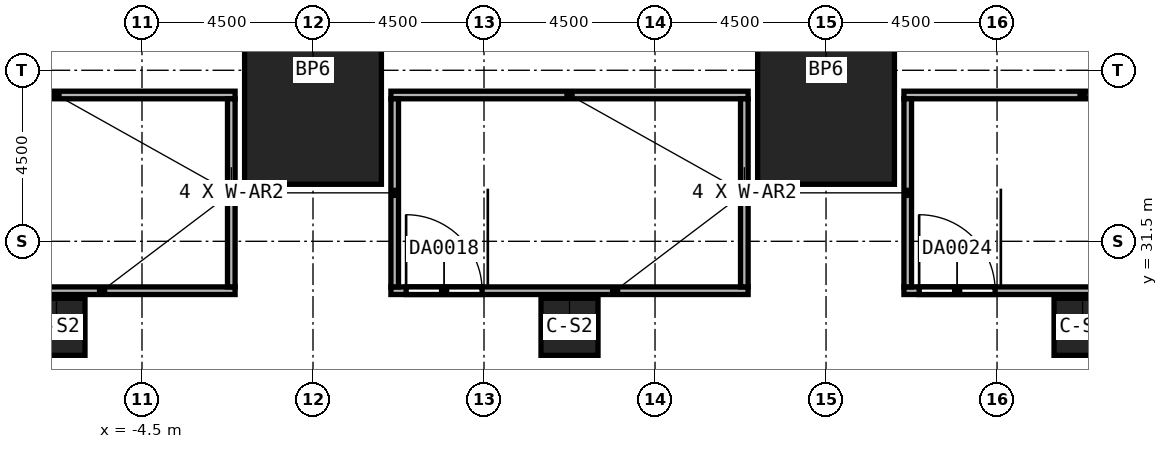
"""IFC4 building model, lengths in metres.
Left out: names, types, materials, properties, quantities, classifications, styles, units other than length and angle.
Written with IfcOpenShell. Run it as: python <this file> out.ifc"""

import sys

from ifc_helpers import new_model, si_unit, direction, frame, frame_2d, origin, origin_2d, place, context, subcontext, project, spatial, rectangle, extrude, element, fill, save


model = new_model("IFC4")
c1 = context("Model", 3, precision=1e-05, world=origin(), true_north=direction((0.0, 1.0)))
c2 = subcontext(c1, "Body", "Model", "MODEL_VIEW")
j1 = project(units=[si_unit("LENGTHUNIT", "METRE"), si_unit("PLANEANGLEUNIT", "RADIAN")], contexts=[c1])
p1 = place(None, origin())
s1 = spatial("IfcSite", under=j1, at=p1, CompositionType="ELEMENT")
p2 = place(p1, origin())
s2 = spatial("IfcBuilding", under=s1, at=p2, CompositionType="ELEMENT")
p3 = place(p2, frame((0.0, 0.0, 37.0)))
s3 = spatial("IfcBuildingStorey", under=s2, at=p3, CompositionType="ELEMENT", Elevation=37.0)
for number, where, z_axis, x_axis in (
    (1, (0.0, 36.0, 0.0), (0.0, 0.0, 1.0), (1.0, 0.0, 0.0)),
    (2, (13.5, 36.0, 0.0), (0.0, 0.0, 1.0), (1.0, 0.0, 0.0)),
):
    element("IfcColumn", number, at=place(p3, frame(where, z_axis=z_axis, x_axis=x_axis)), inside=s3, PredefinedType="COLUMN", context=c2, shape_type="SweptSolid", body=[
        extrude(rectangle(XDim=3.6, YDim=6.0, at=origin_2d()), origin(), (0.0, 0.0, 1.0), 5.8),
    ])
for number, where, z_axis, x_axis in (
    (3, (-6.75, 29.25, 0.0), (0.0, 0.0, 1.0), (1.0, 0.0, 0.0)),
    (4, (6.75, 29.25, 0.0), (0.0, 0.0, 1.0), (1.0, 0.0, 0.0)),
    (5, (20.25, 29.25, 0.0), (0.0, 0.0, 1.0), (1.0, 0.0, 0.0)),
):
    element("IfcColumn", number, at=place(p3, frame(where, z_axis=z_axis, x_axis=x_axis)), inside=s3, PredefinedType="COLUMN", context=c2, shape_type="SweptSolid", body=[
        extrude(rectangle(XDim=1.5, YDim=1.5, at=origin_2d()), origin(), (0.0, 0.0, 1.0), 7.0),
    ])
p4 = place(p3, frame((-11.45, 30.2, 0.0), z_axis=(0.0, 0.0, 1.0), x_axis=(1.0, 0.0, 0.0)))
e6 = element("IfcWall", 6, at=p4, inside=s3, PredefinedType="SOLIDWALL", context=c2, shape_type="SweptSolid", body=[
    extrude(rectangle(XDim=9.4, YDim=0.2, at=frame_2d((4.7, 0.0))), origin(), (0.0, 0.0, 1.0), 7.0),
])
p5 = place(p4, frame((0.4, 0.0, 0.0)))
e7 = element("IfcOpeningElement", 7, at=p5, cuts=e6, PredefinedType="OPENING", context=c2, shape_type="SweptSolid", body=[
    extrude(rectangle(XDim=2.0, YDim=2.4, at=frame_2d((1.0, 1.2))), frame((0.0, 0.1, 0.0), z_axis=(0.0, -1.0, 0.0), x_axis=(1.0, 0.0, 0.0)), (0.0, 0.0, 1.0), 0.2),
])
p6 = place(p3, frame((-11.45, 35.35, 0.0), z_axis=(0.0, 0.0, 1.0), x_axis=(1.0, 0.0, 0.0)))
e8 = element("IfcWall", 8, at=p6, inside=s3, PredefinedType="SOLIDWALL", context=c2, shape_type="SweptSolid", body=[
    extrude(rectangle(XDim=9.4, YDim=0.2, at=frame_2d((4.7, 0.0))), origin(), (0.0, 0.0, 1.0), 7.0),
])
p7 = place(p3, frame((-2.15, 30.3, 0.0), z_axis=(0.0, 0.0, 1.0), x_axis=(0.0, 1.0, 0.0)))
e9 = element("IfcWall", 9, at=p7, inside=s3, PredefinedType="SOLIDWALL", context=c2, shape_type="SweptSolid", body=[
    extrude(rectangle(XDim=4.95, YDim=0.2, at=frame_2d((2.475, 0.0))), origin(), (0.0, 0.0, 1.0), 7.0),
])
p8 = place(p3, frame((2.05, 30.2, 0.0), z_axis=(0.0, 0.0, 1.0), x_axis=(1.0, 0.0, 0.0)))
e10 = element("IfcWall", 10, at=p8, inside=s3, PredefinedType="SOLIDWALL", context=c2, shape_type="SweptSolid", body=[
    extrude(rectangle(XDim=9.4, YDim=0.2, at=frame_2d((4.7, 0.0))), origin(), (0.0, 0.0, 1.0), 7.0),
])
p9 = place(p8, frame((0.4, 0.0, 0.0)))
e11 = element("IfcOpeningElement", 11, at=p9, cuts=e10, PredefinedType="OPENING", context=c2, shape_type="SweptSolid", body=[
    extrude(rectangle(XDim=2.0, YDim=2.4, at=frame_2d((1.0, 1.2))), frame((0.0, 0.1, 0.0), z_axis=(0.0, -1.0, 0.0), x_axis=(1.0, 0.0, 0.0)), (0.0, 0.0, 1.0), 0.2),
])
p10 = place(p3, frame((2.05, 35.35, 0.0), z_axis=(0.0, 0.0, 1.0), x_axis=(1.0, 0.0, 0.0)))
e12 = element("IfcWall", 12, at=p10, inside=s3, PredefinedType="SOLIDWALL", context=c2, shape_type="SweptSolid", body=[
    extrude(rectangle(XDim=9.4, YDim=0.2, at=frame_2d((4.7, 0.0))), origin(), (0.0, 0.0, 1.0), 7.0),
])
for number, where, z_axis, x_axis in (
    (13, (2.15, 30.3, 0.0), (0.0, 0.0, 1.0), (0.0, 1.0, 0.0)),
    (14, (11.35, 30.3, 0.0), (0.0, 0.0, 1.0), (0.0, 1.0, 0.0)),
):
    element("IfcWall", number, at=place(p3, frame(where, z_axis=z_axis, x_axis=x_axis)), inside=s3, PredefinedType="SOLIDWALL", context=c2, shape_type="SweptSolid", body=[
        extrude(rectangle(XDim=4.95, YDim=0.2, at=frame_2d((2.475, 0.0))), origin(), (0.0, 0.0, 1.0), 7.0),
    ])
p11 = place(p3, frame((15.55, 30.2, 0.0), z_axis=(0.0, 0.0, 1.0), x_axis=(1.0, 0.0, 0.0)))
e15 = element("IfcWall", 15, at=p11, inside=s3, PredefinedType="SOLIDWALL", context=c2, shape_type="SweptSolid", body=[
    extrude(rectangle(XDim=9.4, YDim=0.2, at=frame_2d((4.7, 0.0))), origin(), (0.0, 0.0, 1.0), 7.0),
])
p12 = place(p11, frame((0.4, 0.0, 0.0)))
e16 = element("IfcOpeningElement", 16, at=p12, cuts=e15, PredefinedType="OPENING", context=c2, shape_type="SweptSolid", body=[
    extrude(rectangle(XDim=2.0, YDim=2.4, at=frame_2d((1.0, 1.2))), frame((0.0, 0.1, 0.0), z_axis=(0.0, -1.0, 0.0), x_axis=(1.0, 0.0, 0.0)), (0.0, 0.0, 1.0), 0.2),
])
p13 = place(p3, frame((15.55, 35.35, 0.0), z_axis=(0.0, 0.0, 1.0), x_axis=(1.0, 0.0, 0.0)))
e17 = element("IfcWall", 17, at=p13, inside=s3, PredefinedType="SOLIDWALL", context=c2, shape_type="SweptSolid", body=[
    extrude(rectangle(XDim=9.4, YDim=0.2, at=frame_2d((4.7, 0.0))), origin(), (0.0, 0.0, 1.0), 7.0),
])
p14 = place(p3, frame((15.65, 30.3, 0.0), z_axis=(0.0, 0.0, 1.0), x_axis=(0.0, 1.0, 0.0)))
e18 = element("IfcWall", 18, at=p14, inside=s3, PredefinedType="SOLIDWALL", context=c2, shape_type="SweptSolid", body=[
    extrude(rectangle(XDim=4.95, YDim=0.2, at=frame_2d((2.475, 0.0))), origin(), (0.0, 0.0, 1.0), 7.0),
])
p15 = place(p9, origin())
e19 = element("IfcDoor", 19, at=p15, inside=s3, OperationType="DOUBLE_DOOR_SINGLE_SWING", PredefinedType="DOOR", context=c2, shape_type="SweptSolid", body=[
    extrude(rectangle(XDim=2.0, YDim=2.4, at=frame_2d((1.0, 1.2))), frame((0.0, 0.025, 0.0), z_axis=(0.0, -1.0, 0.0), x_axis=(1.0, 0.0, 0.0)), (0.0, 0.0, 1.0), 0.05),
])
fill(e11, e19)
p16 = place(p12, origin())
e20 = element("IfcDoor", 20, at=p16, inside=s3, OperationType="DOUBLE_DOOR_SINGLE_SWING", PredefinedType="DOOR", context=c2, shape_type="SweptSolid", body=[
    extrude(rectangle(XDim=2.0, YDim=2.4, at=frame_2d((1.0, 1.2))), frame((0.0, 0.025, 0.0), z_axis=(0.0, -1.0, 0.0), x_axis=(1.0, 0.0, 0.0)), (0.0, 0.0, 1.0), 0.05),
])
fill(e16, e20)
save(model, sys.argv[1])
